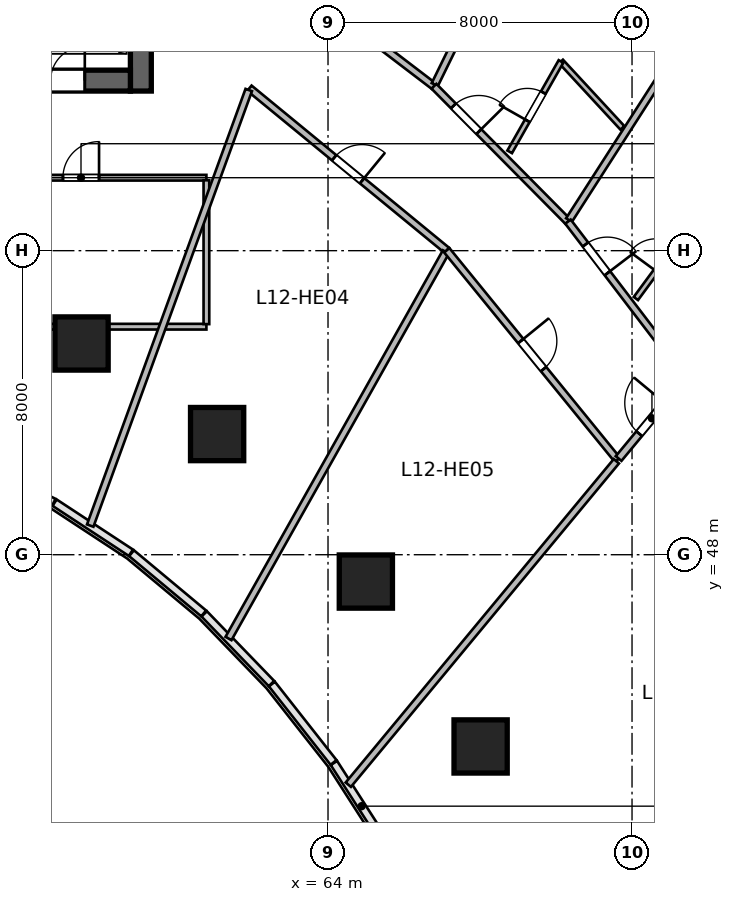
"""IFC4 building model, lengths in metres.
Left out: names, types, materials, properties, quantities, classifications, styles, units other than length and angle.
Written with IfcOpenShell. Run it as: python <this file> out.ifc"""

import sys

from ifc_helpers import new_model, si_unit, direction, frame, frame_2d, origin, origin_2d, place, context, subcontext, project, spatial, rectangle, circle, extrude, source, transform, mapped, element, fill, save


model = new_model("IFC4")
c1 = context("Model", 3, precision=1e-05, world=origin(), true_north=direction((0.0, 1.0)))
c2 = subcontext(c1, "Body", "Model", "MODEL_VIEW")
j1 = project(units=[si_unit("LENGTHUNIT", "METRE"), si_unit("PLANEANGLEUNIT", "RADIAN")], contexts=[c1])
p1 = place(None, origin())
s1 = spatial("IfcSite", under=j1, at=p1, CompositionType="ELEMENT")
p2 = place(p1, origin())
s2 = spatial("IfcBuilding", under=s1, at=p2, CompositionType="ELEMENT")
p3 = place(p2, frame((0.0, 0.0, 57.0)))
s3 = spatial("IfcBuildingStorey", under=s2, at=p3, CompositionType="ELEMENT", Elevation=57.0)
m1 = source(origin(), c2, "Body", "SweptSolid", [
    extrude(rectangle(XDim=12.0, YDim=0.55, at=frame_2d((6.0, 0.0))), origin(), (0.0, 0.0, 1.0), 3.6),
])
p4 = place(p3, frame((59.075, 60.2, 0.0), z_axis=(0.0, 0.0, 1.0), x_axis=(0.0, 1.0, 0.0)))
e1 = element("IfcWall", 1, at=p4, inside=s3, PredefinedType="SHEAR", context=c2, shape_type="MappedRepresentation", body=[
    mapped(m1, transform((0.0, 0.0, 0.0), scale=1.0)),
])
m2 = source(origin(), c2, "Body", "SweptSolid", [
    extrude(rectangle(XDim=21.6, YDim=0.55, at=frame_2d((10.8, 0.0))), origin(), (0.0, 0.0, 1.0), 3.6),
])
p5 = place(p3, frame((37.2, 60.475, 0.0), z_axis=(0.0, 0.0, 1.0), x_axis=(1.0, 0.0, 0.0)))
e2 = element("IfcWall", 2, at=p5, inside=s3, PredefinedType="SHEAR", context=c2, shape_type="MappedRepresentation", body=[
    mapped(m2, transform((0.0, 0.0, 0.0), scale=1.0)),
])
p6 = place(p5, frame((1.1, 0.0, 0.0)))
e3 = element("IfcOpeningElement", 3, at=p6, cuts=e2, PredefinedType="OPENING", context=c2, shape_type="SweptSolid", body=[
    extrude(rectangle(XDim=1.15, YDim=2.15, at=frame_2d((0.575, 1.075))), frame((0.0, 0.285, 0.0), z_axis=(0.0, -1.0, 0.0), x_axis=(1.0, 0.0, 0.0)), (0.0, 0.0, 1.0), 0.57),
])
p7 = place(p5, frame((19.5, 0.0, 0.0)))
e4 = element("IfcOpeningElement", 4, at=p7, cuts=e2, PredefinedType="OPENING", context=c2, shape_type="SweptSolid", body=[
    extrude(rectangle(XDim=0.9, YDim=2.1, at=frame_2d((0.45, 1.05))), frame((0.0, 0.285, 0.0), z_axis=(0.0, -1.0, 0.0), x_axis=(1.0, 0.0, 0.0)), (0.0, 0.0, 1.0), 0.57),
])
p8 = place(p5, frame((12.02, 0.0, 0.0)))
e5 = element("IfcOpeningElement", 5, at=p8, cuts=e2, PredefinedType="OPENING", context=c2, shape_type="SweptSolid", body=[
    extrude(rectangle(XDim=1.6, YDim=2.15, at=frame_2d((0.8, 1.075))), frame((0.0, 0.285, 0.0), z_axis=(0.0, -1.0, 0.0), x_axis=(1.0, 0.0, 0.0)), (0.0, 0.0, 1.0), 0.57),
])
m3 = source(origin(), c2, "Body", "SweptSolid", [
    extrude(circle(Radius=0.7, at=origin_2d()), origin(), (0.0, 0.0, 1.0), 3.6),
])
for number, where, z_axis, x_axis in (
    (6, (57.515, 53.558, 0.0), (0.0, 0.0, 1.0), (0.289, 0.957, 0.0)),
    (7, (61.082, 51.175, 0.0), (0.0, 0.0, 1.0), (0.409, 0.912, 0.0)),
    (8, (64.996, 47.294, 0.0), (0.0, 0.0, 1.0), (0.558, 0.83, 0.0)),
    (9, (68.015, 42.955, 0.0), (0.0, 0.0, 1.0), (0.691, 0.723, 0.0)),
):
    element("IfcColumn", number, at=place(p3, frame(where, z_axis=z_axis, x_axis=x_axis)), inside=s3, PredefinedType="COLUMN", context=c2, shape_type="MappedRepresentation", body=[
        mapped(m3, transform((0.0, 0.0, 0.0), scale=1.0)),
    ])
m4 = source(origin(), c2, "Body", "SweptSolid", [
    extrude(rectangle(XDim=6.6, YDim=0.15, at=frame_2d((3.3, 0.0))), origin(), (0.0, 0.0, 1.0), 2.803),
])
p9 = place(p3, frame((54.2, 54.0, 0.0), z_axis=(0.0, 0.0, 1.0), x_axis=(1.0, 0.0, 0.0)))
e10 = element("IfcWall", 10, at=p9, inside=s3, PredefinedType="PARTITIONING", context=c2, shape_type="MappedRepresentation", body=[
    mapped(m4, transform((0.0, 0.0, 0.0), scale=1.0)),
])
m5 = source(origin(), c2, "Body", "SweptSolid", [
    extrude(rectangle(XDim=6.6, YDim=0.15, at=frame_2d((3.3, 0.0))), origin(), (0.0, 0.0, 1.0), 3.36),
])
p10 = place(p3, frame((54.2, 57.92, 0.0), z_axis=(0.0, 0.0, 1.0), x_axis=(1.0, 0.0, 0.0)))
e11 = element("IfcWall", 11, at=p10, inside=s3, PredefinedType="PARTITIONING", context=c2, shape_type="MappedRepresentation", body=[
    mapped(m5, transform((0.0, 0.0, 0.0), scale=1.0)),
])
p11 = place(p10, frame((2.825, 0.0, 0.0)))
e12 = element("IfcOpeningElement", 12, at=p11, cuts=e11, PredefinedType="OPENING", context=c2, shape_type="SweptSolid", body=[
    extrude(rectangle(XDim=0.95, YDim=2.1, at=frame_2d((0.475, 1.05))), frame((0.0, 0.085, 0.0), z_axis=(0.0, -1.0, 0.0), x_axis=(1.0, 0.0, 0.0)), (0.0, 0.0, 1.0), 0.17),
])
m6 = source(origin(), c2, "Body", "SweptSolid", [
    extrude(rectangle(XDim=3.785, YDim=0.15, at=frame_2d((1.893, 0.0))), origin(), (0.0, 0.0, 1.0), 3.36),
])
p12 = place(p3, frame((60.8, 54.067, 0.0), z_axis=(0.0, 0.0, 1.0), x_axis=(0.0, 1.0, 0.0)))
e13 = element("IfcWall", 13, at=p12, inside=s3, PredefinedType="PARTITIONING", context=c2, shape_type="MappedRepresentation", body=[
    mapped(m6, transform((0.0, 0.0, 0.0), scale=1.0)),
])
m7 = source(origin(), c2, "Body", "SweptSolid", [
    extrude(rectangle(XDim=4.762, YDim=0.18, at=frame_2d((2.381, 0.0))), origin(), (0.0, 0.0, 1.0), 3.36),
])
p13 = place(p3, frame((63.001, 63.214, 0.0), z_axis=(0.0, 0.0, 1.0), x_axis=(0.795070295872, -0.60651729128, 0.0)))
e14 = element("IfcWall", 14, at=p13, inside=s3, PredefinedType="PLUMBINGWALL", context=c2, shape_type="MappedRepresentation", body=[
    mapped(m7, transform((0.0, 0.0, 0.0), scale=1.0)),
])
p14 = place(p13, frame((0.668, 0.0, 0.0)))
e15 = element("IfcOpeningElement", 15, at=p14, cuts=e14, PredefinedType="OPENING", context=c2, shape_type="SweptSolid", body=[
    extrude(rectangle(XDim=0.95, YDim=2.15, at=frame_2d((0.475, 1.075))), frame((0.0, 0.1, 0.0), z_axis=(0.0, -1.0, 0.0), x_axis=(1.0, 0.0, 0.0)), (0.0, 0.0, 1.0), 0.2),
])
m8 = source(origin(), c2, "Body", "SweptSolid", [
    extrude(rectangle(XDim=11.775, YDim=0.18, at=frame_2d((5.887, 0.0))), origin(), (0.0, 0.0, 1.0), 3.36),
])
p15 = place(p3, frame((66.81, 60.371, 0.0), z_axis=(0.0, 0.0, 1.0), x_axis=(0.4401500056, 0.897924257702, 0.0)))
e16 = element("IfcWall", 16, at=p15, inside=s3, PredefinedType="PLUMBINGWALL", context=c2, shape_type="MappedRepresentation", body=[
    mapped(m8, transform((0.0, 0.0, 0.0), scale=1.0)),
])
m9 = source(origin(), c2, "Body", "SweptSolid", [
    extrude(rectangle(XDim=5.012, YDim=0.18, at=frame_2d((2.506, 0.0))), origin(), (0.0, 0.0, 1.0), 3.36),
])
p16 = place(p3, frame((66.788, 60.326, 0.0), z_axis=(0.0, 0.0, 1.0), x_axis=(0.703664626435, -0.710532260707, 0.0)))
e17 = element("IfcWall", 17, at=p16, inside=s3, PredefinedType="PLUMBINGWALL", context=c2, shape_type="MappedRepresentation", body=[
    mapped(m9, transform((0.0, 0.0, 0.0), scale=1.0)),
])
p17 = place(p16, frame((0.728, 0.0, 0.0)))
e18 = element("IfcOpeningElement", 18, at=p17, cuts=e17, PredefinedType="OPENING", context=c2, shape_type="SweptSolid", body=[
    extrude(rectangle(XDim=0.95, YDim=2.15, at=frame_2d((0.475, 1.075))), frame((0.0, 0.1, 0.0), z_axis=(0.0, -1.0, 0.0), x_axis=(1.0, 0.0, 0.0)), (0.0, 0.0, 1.0), 0.2),
])
m10 = source(origin(), c2, "Body", "SweptSolid", [
    extrude(rectangle(XDim=11.432, YDim=0.18, at=frame_2d((5.716, 0.0))), origin(), (0.0, 0.0, 1.0), 3.36),
])
p18 = place(p3, frame((70.341, 56.805, 0.0), z_axis=(0.0, 0.0, 1.0), x_axis=(0.540196183124, 0.841539115988, 0.0)))
e19 = element("IfcWall", 19, at=p18, inside=s3, PredefinedType="PLUMBINGWALL", context=c2, shape_type="MappedRepresentation", body=[
    mapped(m10, transform((0.0, 0.0, 0.0), scale=1.0)),
])
m11 = source(origin(), c2, "Body", "SweptSolid", [
    extrude(rectangle(XDim=2.38, YDim=0.14, at=frame_2d((1.19, 0.0))), origin(), (0.0, 0.0, 1.0), 3.36),
])
p19 = place(p3, frame((70.131, 60.979, 0.0), z_axis=(0.0, 0.0, 1.0), x_axis=(0.679084816758, -0.734059814762, 0.0)))
e20 = element("IfcWall", 20, at=p19, inside=s3, PredefinedType="PARTITIONING", context=c2, shape_type="MappedRepresentation", body=[
    mapped(m11, transform((0.0, 0.0, 0.0), scale=1.0)),
])
m12 = source(origin(), c2, "Body", "SweptSolid", [
    extrude(rectangle(XDim=2.735, YDim=0.14, at=frame_2d((1.367, 0.0))), origin(), (0.0, 0.0, 1.0), 3.36),
])
p20 = place(p3, frame((68.781, 58.6, 0.0), z_axis=(0.0, 0.0, 1.0), x_axis=(0.493694940578, 0.869635156631, 0.0)))
e21 = element("IfcWall", 21, at=p20, inside=s3, PredefinedType="PARTITIONING", context=c2, shape_type="MappedRepresentation", body=[
    mapped(m12, transform((0.0, 0.0, 0.0), scale=1.0)),
])
p21 = place(p20, frame((0.942, 0.0, 0.0)))
e22 = element("IfcOpeningElement", 22, at=p21, cuts=e21, PredefinedType="OPENING", context=c2, shape_type="SweptSolid", body=[
    extrude(rectangle(XDim=0.85, YDim=2.05, at=frame_2d((0.425, 1.025))), frame((0.0, 0.08, 0.0), z_axis=(0.0, -1.0, 0.0), x_axis=(1.0, 0.0, 0.0)), (0.0, 0.0, 1.0), 0.16),
])
m13 = source(origin(), c2, "Body", "SweptSolid", [
    extrude(rectangle(XDim=5.135, YDim=0.18, at=frame_2d((2.567, 0.0))), origin(), (0.0, 0.0, 1.0), 3.36),
])
p22 = place(p3, frame((70.315, 56.764, 0.0), z_axis=(0.0, 0.0, 1.0), x_axis=(0.606802199649, -0.794852873494, 0.0)))
e23 = element("IfcWall", 23, at=p22, inside=s3, PredefinedType="PLUMBINGWALL", context=c2, shape_type="MappedRepresentation", body=[
    mapped(m13, transform((0.0, 0.0, 0.0), scale=1.0)),
])
p23 = place(p22, frame((0.757, 0.0, 0.0)))
e24 = element("IfcOpeningElement", 24, at=p23, cuts=e23, PredefinedType="OPENING", context=c2, shape_type="SweptSolid", body=[
    extrude(rectangle(XDim=0.95, YDim=2.15, at=frame_2d((0.475, 1.075))), frame((0.0, 0.1, 0.0), z_axis=(0.0, -1.0, 0.0), x_axis=(1.0, 0.0, 0.0)), (0.0, 0.0, 1.0), 0.2),
])
m14 = source(origin(), c2, "Body", "SweptSolid", [
    extrude(rectangle(XDim=2.642, YDim=0.14, at=frame_2d((1.321, 0.0))), origin(), (0.0, 0.0, 1.0), 3.36),
])
p24 = place(p3, frame((72.101, 54.741, 0.0), z_axis=(0.0, 0.0, 1.0), x_axis=(0.592789122423, 0.805357719487, 0.0)))
e25 = element("IfcWall", 25, at=p24, inside=s3, PredefinedType="PARTITIONING", context=c2, shape_type="MappedRepresentation", body=[
    mapped(m14, transform((0.0, 0.0, 0.0), scale=1.0)),
])
p25 = place(p24, frame((0.896, 0.0, 0.0)))
e26 = element("IfcOpeningElement", 26, at=p25, cuts=e25, PredefinedType="OPENING", context=c2, shape_type="SweptSolid", body=[
    extrude(rectangle(XDim=0.85, YDim=2.05, at=frame_2d((0.425, 1.025))), frame((0.0, 0.08, 0.0), z_axis=(0.0, -1.0, 0.0), x_axis=(1.0, 0.0, 0.0)), (0.0, 0.0, 1.0), 0.16),
])
m15 = source(origin(), c2, "Body", "SweptSolid", [
    extrude(rectangle(XDim=6.721, YDim=0.18, at=frame_2d((3.361, 0.0))), origin(), (0.0, 0.0, 1.0), 3.36),
])
p26 = place(p3, frame((61.931, 60.275, 0.0), z_axis=(0.0, 0.0, 1.0), x_axis=(0.772828051199, -0.63461547671, 0.0)))
e27 = element("IfcWall", 27, at=p26, inside=s3, PredefinedType="PLUMBINGWALL", context=c2, shape_type="MappedRepresentation", body=[
    mapped(m15, transform((0.0, 0.0, 0.0), scale=1.0)),
])
p27 = place(p26, frame((2.885, 0.0, 0.0)))
e28 = element("IfcOpeningElement", 28, at=p27, cuts=e27, PredefinedType="OPENING", context=c2, shape_type="SweptSolid", body=[
    extrude(rectangle(XDim=0.95, YDim=2.15, at=frame_2d((0.475, 1.075))), frame((0.0, 0.1, 0.0), z_axis=(0.0, -1.0, 0.0), x_axis=(1.0, 0.0, 0.0)), (0.0, 0.0, 1.0), 0.2),
])
m16 = source(origin(), c2, "Body", "SweptSolid", [
    extrude(rectangle(XDim=12.196, YDim=0.18, at=frame_2d((6.098, 0.0))), origin(), (0.0, 0.0, 1.0), 3.36),
])
p28 = place(p3, frame((57.742, 48.766, 0.0), z_axis=(0.0, 0.0, 1.0), x_axis=(0.342022711534, 0.939691686031, 0.0)))
e29 = element("IfcWall", 29, at=p28, inside=s3, PredefinedType="PLUMBINGWALL", context=c2, shape_type="MappedRepresentation", body=[
    mapped(m16, transform((0.0, 0.0, 0.0), scale=1.0)),
])
m17 = source(origin(), c2, "Body", "SweptSolid", [
    extrude(rectangle(XDim=11.67, YDim=0.18, at=frame_2d((5.835, 0.0))), origin(), (0.0, 0.0, 1.0), 3.36),
])
p29 = place(p3, frame((61.381, 45.795, 0.0), z_axis=(0.0, 0.0, 1.0), x_axis=(0.490156946222, 0.871634193954, 0.0)))
e30 = element("IfcWall", 30, at=p29, inside=s3, PredefinedType="PLUMBINGWALL", context=c2, shape_type="MappedRepresentation", body=[
    mapped(m17, transform((0.0, 0.0, 0.0), scale=1.0)),
])
m18 = source(origin(), c2, "Body", "SweptSolid", [
    extrude(rectangle(XDim=7.113, YDim=0.18, at=frame_2d((3.556, 0.0))), origin(), (0.0, 0.0, 1.0), 3.36),
])
p30 = place(p3, frame((67.126, 56.01, 0.0), z_axis=(0.0, 0.0, 1.0), x_axis=(0.63149032532, -0.775383755974, 0.0)))
e31 = element("IfcWall", 31, at=p30, inside=s3, PredefinedType="PLUMBINGWALL", context=c2, shape_type="MappedRepresentation", body=[
    mapped(m18, transform((0.0, 0.0, 0.0), scale=1.0)),
])
p31 = place(p30, frame((3.081, 0.0, 0.0)))
e32 = element("IfcOpeningElement", 32, at=p31, cuts=e31, PredefinedType="OPENING", context=c2, shape_type="SweptSolid", body=[
    extrude(rectangle(XDim=0.95, YDim=2.15, at=frame_2d((0.475, 1.075))), frame((0.0, 0.1, 0.0), z_axis=(0.0, -1.0, 0.0), x_axis=(1.0, 0.0, 0.0)), (0.0, 0.0, 1.0), 0.2),
])
m19 = source(origin(), c2, "Body", "SweptSolid", [
    extrude(rectangle(XDim=11.053, YDim=0.18, at=frame_2d((5.527, 0.0))), origin(), (0.0, 0.0, 1.0), 3.36),
])
p32 = place(p3, frame((64.534, 41.949, 0.0), z_axis=(0.0, 0.0, 1.0), x_axis=(0.638131235571, 0.769927611005, 0.0)))
e33 = element("IfcWall", 33, at=p32, inside=s3, PredefinedType="PLUMBINGWALL", context=c2, shape_type="MappedRepresentation", body=[
    mapped(m19, transform((0.0, 0.0, 0.0), scale=1.0)),
])
m20 = source(origin(), c2, "Body", "SweptSolid", [
    extrude(rectangle(XDim=2.748, YDim=0.195, at=frame_2d((1.374, 0.0))), origin(), (0.0, 0.0, 1.0), 3.36),
])
p33 = place(p3, frame((71.647, 50.531, 0.0), z_axis=(0.0, 0.0, 1.0), x_axis=(0.638111168284, 0.769944242729, 0.0)))
e34 = element("IfcWall", 34, at=p33, inside=s3, PredefinedType="PARTITIONING", context=c2, shape_type="MappedRepresentation", body=[
    mapped(m20, transform((0.0, 0.0, 0.0), scale=1.0)),
])
p34 = place(p33, frame((0.849, 0.0, 0.0)))
e35 = element("IfcOpeningElement", 35, at=p34, cuts=e34, PredefinedType="OPENING", context=c2, shape_type="SweptSolid", body=[
    extrude(rectangle(XDim=1.05, YDim=2.15, at=frame_2d((0.525, 1.075))), frame((0.0, 0.107, 0.0), z_axis=(0.0, -1.0, 0.0), x_axis=(1.0, 0.0, 0.0)), (0.0, 0.0, 1.0), 0.215),
])
m21 = source(origin(), c2, "Body", "SweptSolid", [
    extrude(rectangle(XDim=0.9, YDim=2.1, at=frame_2d((0.45, 1.05))), frame((0.0, 0.025, 0.0), z_axis=(0.0, -1.0, 0.0), x_axis=(1.0, 0.0, 0.0)), (0.0, 0.0, 1.0), 0.05),
])
p35 = place(p7, origin())
e36 = element("IfcDoor", 36, at=p35, inside=s3, OperationType="SINGLE_SWING_RIGHT", PredefinedType="DOOR", context=c2, shape_type="MappedRepresentation", body=[
    mapped(m21, transform((0.0, 0.0, 0.0), scale=1.0)),
])
fill(e4, e36)
m22 = source(origin(), c2, "Body", "SweptSolid", [
    extrude(rectangle(XDim=0.95, YDim=2.1, at=frame_2d((0.475, 1.05))), frame((0.0, 0.025, 0.0), z_axis=(0.0, -1.0, 0.0), x_axis=(1.0, 0.0, 0.0)), (0.0, 0.0, 1.0), 0.05),
])
p36 = place(p11, origin())
e37 = element("IfcDoor", 37, at=p36, inside=s3, OperationType="SINGLE_SWING_RIGHT", PredefinedType="DOOR", context=c2, shape_type="MappedRepresentation", body=[
    mapped(m22, transform((0.0, 0.0, 0.0), scale=1.0)),
])
fill(e12, e37)
m23 = source(origin(), c2, "Body", "SweptSolid", [
    extrude(rectangle(XDim=0.95, YDim=2.15, at=frame_2d((0.475, 1.075))), frame((0.0, 0.025, 0.0), z_axis=(0.0, -1.0, 0.0), x_axis=(1.0, 0.0, 0.0)), (0.0, 0.0, 1.0), 0.05),
])
p37 = place(p17, origin())
e38 = element("IfcDoor", 38, at=p37, inside=s3, OperationType="SINGLE_SWING_RIGHT", PredefinedType="DOOR", context=c2, shape_type="MappedRepresentation", body=[
    mapped(m23, transform((0.0, 0.0, 0.0), scale=1.0)),
])
fill(e18, e38)
m24 = source(origin(), c2, "Body", "SweptSolid", [
    extrude(rectangle(XDim=0.85, YDim=2.05, at=frame_2d((0.425, 1.025))), frame((0.0, 0.025, 0.0), z_axis=(0.0, -1.0, 0.0), x_axis=(1.0, 0.0, 0.0)), (0.0, 0.0, 1.0), 0.05),
])
p38 = place(p21, origin())
e39 = element("IfcDoor", 39, at=p38, inside=s3, OperationType="SINGLE_SWING_LEFT", PredefinedType="DOOR", context=c2, shape_type="MappedRepresentation", body=[
    mapped(m24, transform((0.0, 0.0, 0.0), scale=1.0)),
])
fill(e22, e39)
p39 = place(p23, origin())
e40 = element("IfcDoor", 40, at=p39, inside=s3, OperationType="SINGLE_SWING_RIGHT", PredefinedType="DOOR", context=c2, shape_type="MappedRepresentation", body=[
    mapped(m23, transform((0.0, 0.0, 0.0), scale=1.0)),
])
fill(e24, e40)
p40 = place(p27, origin())
e41 = element("IfcDoor", 41, at=p40, inside=s3, OperationType="SINGLE_SWING_RIGHT", PredefinedType="DOOR", context=c2, shape_type="MappedRepresentation", body=[
    mapped(m23, transform((0.0, 0.0, 0.0), scale=1.0)),
])
fill(e28, e41)
p41 = place(p31, origin())
e42 = element("IfcDoor", 42, at=p41, inside=s3, OperationType="SINGLE_SWING_LEFT", PredefinedType="DOOR", context=c2, shape_type="MappedRepresentation", body=[
    mapped(m23, transform((0.0, 0.0, 0.0), scale=1.0)),
])
fill(e32, e42)
m25 = source(origin(), c2, "Body", "SweptSolid", [
    extrude(rectangle(XDim=1.05, YDim=2.15, at=frame_2d((0.525, 1.075))), frame((0.0, 0.025, 0.0), z_axis=(0.0, -1.0, 0.0), x_axis=(1.0, 0.0, 0.0)), (0.0, 0.0, 1.0), 0.05),
])
p42 = place(p34, origin())
e43 = element("IfcDoor", 43, at=p42, inside=s3, OperationType="SINGLE_SWING_RIGHT", PredefinedType="DOOR", context=c2, shape_type="MappedRepresentation", body=[
    mapped(m25, transform((0.0, 0.0, 0.0), scale=1.0)),
])
fill(e35, e43)
save(model, sys.argv[1])
